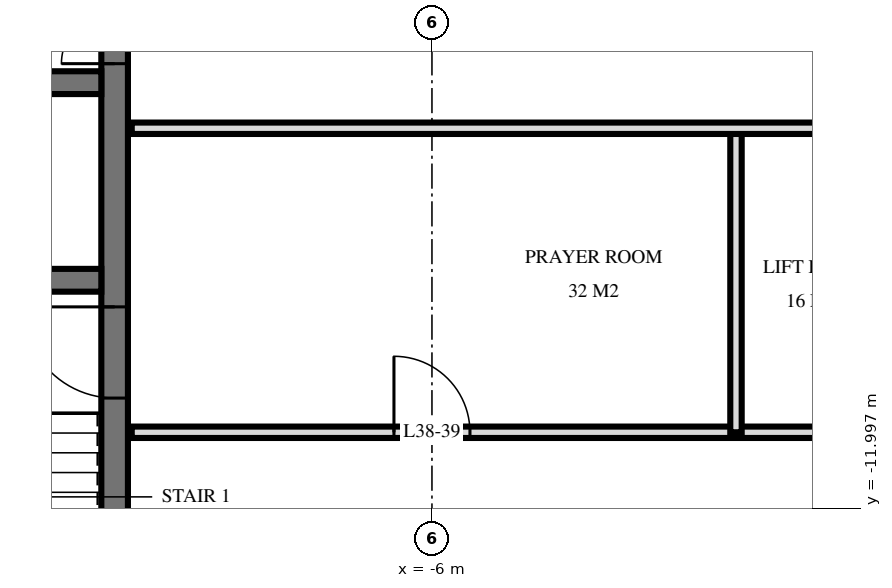
"""IFC4 building model, lengths in metres.
Left out: names, types, materials, properties, quantities, classifications, styles, units other than length and angle.
Written with IfcOpenShell. Run it as: python <this file> out.ifc"""

import sys

from ifc_helpers import new_model, si_unit, direction, frame, frame_2d, origin, place, context, subcontext, project, spatial, rectangle, extrude, element, fill, save


model = new_model("IFC4")
c1 = context("Model", 3, precision=1e-05, world=origin(), true_north=direction((0.0, 1.0)))
c2 = subcontext(c1, "Body", "Model", "MODEL_VIEW")
j1 = project(units=[si_unit("LENGTHUNIT", "METRE"), si_unit("PLANEANGLEUNIT", "RADIAN")], contexts=[c1])
p1 = place(None, origin())
s1 = spatial("IfcSite", under=j1, at=p1, CompositionType="ELEMENT")
p2 = place(p1, origin())
s2 = spatial("IfcBuilding", under=s1, at=p2, CompositionType="ELEMENT")
p3 = place(p2, frame((0.0, 0.0, 148.8)))
s3 = spatial("IfcBuildingStorey", under=s2, at=p3, CompositionType="ELEMENT", Elevation=148.8)
p4 = place(p3, frame((-10.175, -14.55, 0.0), z_axis=(0.0, 0.0, 1.0), x_axis=(0.0, 1.0, 0.0)))
e1 = element("IfcWall", 1, at=p4, inside=s3, PredefinedType="SHEAR", context=c2, shape_type="SweptSolid", body=[
    extrude(rectangle(XDim=14.1, YDim=0.35, at=frame_2d((7.05, 0.0))), origin(), (0.0, 0.0, 1.0), 3.6),
])
p5 = place(p4, frame((8.4, 0.0, 0.0)))
e2 = element("IfcOpeningElement", 2, at=p5, cuts=e1, PredefinedType="OPENING", context=c2, shape_type="SweptSolid", body=[
    extrude(rectangle(XDim=1.4, YDim=2.4, at=frame_2d((0.7, 1.2))), frame((0.0, 0.185, 0.0), z_axis=(0.0, -1.0, 0.0), x_axis=(1.0, 0.0, 0.0)), (0.0, 0.0, 1.0), 0.37),
])
p6 = place(p4, frame((10.0, 0.0, 0.0)))
e3 = element("IfcOpeningElement", 3, at=p6, cuts=e1, PredefinedType="OPENING", context=c2, shape_type="SweptSolid", body=[
    extrude(rectangle(XDim=1.4, YDim=2.4, at=frame_2d((0.7, 1.2))), frame((0.0, 0.185, 0.0), z_axis=(0.0, -1.0, 0.0), x_axis=(1.0, 0.0, 0.0)), (0.0, 0.0, 1.0), 0.37),
])
p7 = place(p4, frame((4.0, 0.0, 0.0)))
e4 = element("IfcOpeningElement", 4, at=p7, cuts=e1, PredefinedType="OPENING", context=c2, shape_type="SweptSolid", body=[
    extrude(rectangle(XDim=1.2, YDim=2.1, at=frame_2d((0.6, 1.05))), frame((0.0, 0.185, 0.0), z_axis=(0.0, -1.0, 0.0), x_axis=(1.0, 0.0, 0.0)), (0.0, 0.0, 1.0), 0.37),
])
p8 = place(p3, frame((-24.05, -6.4, 0.0), z_axis=(0.0, 0.0, 1.0), x_axis=(1.0, 0.0, 0.0)))
e5 = element("IfcWall", 5, at=p8, inside=s3, PredefinedType="SHEAR", context=c2, shape_type="SweptSolid", body=[
    extrude(rectangle(XDim=13.7, YDim=0.3, at=frame_2d((6.85, 0.0))), origin(), (0.0, 0.0, 1.0), 3.6),
])
p9 = place(p8, frame((0.55, 0.0, 0.0)))
e6 = element("IfcOpeningElement", 6, at=p9, cuts=e5, PredefinedType="OPENING", context=c2, shape_type="SweptSolid", body=[
    extrude(rectangle(XDim=1.1, YDim=2.1, at=frame_2d((0.55, 1.05))), frame((0.0, 0.16, 0.0), z_axis=(0.0, -1.0, 0.0), x_axis=(1.0, 0.0, 0.0)), (0.0, 0.0, 1.0), 0.32),
])
p10 = place(p8, frame((5.8, 0.0, 0.0)))
e7 = element("IfcOpeningElement", 7, at=p10, cuts=e5, PredefinedType="OPENING", context=c2, shape_type="SweptSolid", body=[
    extrude(rectangle(XDim=1.1, YDim=2.1, at=frame_2d((0.55, 1.05))), frame((0.0, 0.16, 0.0), z_axis=(0.0, -1.0, 0.0), x_axis=(1.0, 0.0, 0.0)), (0.0, 0.0, 1.0), 0.32),
])
p11 = place(p3, frame((-24.05, -9.0, 0.0), z_axis=(0.0, 0.0, 1.0), x_axis=(1.0, 0.0, 0.0)))
e8 = element("IfcWall", 8, at=p11, inside=s3, PredefinedType="SHEAR", context=c2, shape_type="SweptSolid", body=[
    extrude(rectangle(XDim=13.7, YDim=0.3, at=frame_2d((6.85, 0.0))), origin(), (0.0, 0.0, 1.0), 3.6),
])
p12 = place(p11, frame((8.8, 0.0, 0.0)))
e9 = element("IfcOpeningElement", 9, at=p12, cuts=e8, PredefinedType="OPENING", context=c2, shape_type="SweptSolid", body=[
    extrude(rectangle(XDim=1.1, YDim=2.1, at=frame_2d((0.55, 1.05))), frame((0.0, 0.16, 0.0), z_axis=(0.0, -1.0, 0.0), x_axis=(1.0, 0.0, 0.0)), (0.0, 0.0, 1.0), 0.32),
])
p13 = place(p3, frame((-2.0, -11.0, 0.0), z_axis=(0.0, 0.0, 1.0), x_axis=(0.0, 1.0, 0.0)))
e10 = element("IfcWall", 10, at=p13, inside=s3, PredefinedType="PARTITIONING", context=c2, shape_type="SweptSolid", body=[
    extrude(rectangle(XDim=4.0, YDim=0.15, at=frame_2d((2.0, 0.0))), origin(), (0.0, 0.0, 1.0), 3.32),
])
p14 = place(p3, frame((-9.95, -11.0, 0.0), z_axis=(0.0, 0.0, 1.0), x_axis=(1.0, 0.0, 0.0)))
e11 = element("IfcWall", 11, at=p14, inside=s3, PredefinedType="PARTITIONING", context=c2, shape_type="SweptSolid", body=[
    extrude(rectangle(XDim=19.9, YDim=0.15, at=frame_2d((9.95, 0.0))), origin(), (0.0, 0.0, 1.0), 3.32),
])
p15 = place(p14, frame((9.45, 0.0, 0.0)))
e12 = element("IfcOpeningElement", 12, at=p15, cuts=e11, PredefinedType="OPENING", context=c2, shape_type="SweptSolid", body=[
    extrude(rectangle(XDim=1.0, YDim=2.1, at=frame_2d((0.5, 1.05))), frame((0.0, 0.085, 0.0), z_axis=(0.0, -1.0, 0.0), x_axis=(1.0, 0.0, 0.0)), (0.0, 0.0, 1.0), 0.17),
])
p16 = place(p14, frame((3.45, 0.0, 0.0)))
e13 = element("IfcOpeningElement", 13, at=p16, cuts=e11, PredefinedType="OPENING", context=c2, shape_type="SweptSolid", body=[
    extrude(rectangle(XDim=1.0, YDim=2.1, at=frame_2d((0.5, 1.05))), frame((0.0, 0.085, 0.0), z_axis=(0.0, -1.0, 0.0), x_axis=(1.0, 0.0, 0.0)), (0.0, 0.0, 1.0), 0.17),
])
p17 = place(p3, frame((-9.95, -7.0, 0.0), z_axis=(0.0, 0.0, 1.0), x_axis=(1.0, 0.0, 0.0)))
e14 = element("IfcWall", 14, at=p17, inside=s3, PredefinedType="PARTITIONING", context=c2, shape_type="SweptSolid", body=[
    extrude(rectangle(XDim=19.9, YDim=0.15, at=frame_2d((9.95, 0.0))), origin(), (0.0, 0.0, 1.0), 3.32),
])
p18 = place(p17, frame((9.45, 0.0, 0.0)))
e15 = element("IfcOpeningElement", 15, at=p18, cuts=e14, PredefinedType="OPENING", context=c2, shape_type="SweptSolid", body=[
    extrude(rectangle(XDim=1.0, YDim=2.1, at=frame_2d((0.5, 1.05))), frame((0.0, 0.085, 0.0), z_axis=(0.0, -1.0, 0.0), x_axis=(1.0, 0.0, 0.0)), (0.0, 0.0, 1.0), 0.17),
])
p19 = place(p17, frame((15.45, 0.0, 0.0)))
e16 = element("IfcOpeningElement", 16, at=p19, cuts=e14, PredefinedType="OPENING", context=c2, shape_type="SweptSolid", body=[
    extrude(rectangle(XDim=1.0, YDim=2.1, at=frame_2d((0.5, 1.05))), frame((0.0, 0.085, 0.0), z_axis=(0.0, -1.0, 0.0), x_axis=(1.0, 0.0, 0.0)), (0.0, 0.0, 1.0), 0.17),
])
p20 = place(p5, origin())
e17 = element("IfcDoor", 17, at=p20, inside=s3, OperationType="DOUBLE_DOOR_SINGLE_SWING", PredefinedType="DOOR", context=c2, shape_type="SweptSolid", body=[
    extrude(rectangle(XDim=1.4, YDim=2.4, at=frame_2d((0.7, 1.2))), frame((0.0, 0.025, 0.0), z_axis=(0.0, -1.0, 0.0), x_axis=(1.0, 0.0, 0.0)), (0.0, 0.0, 1.0), 0.05),
])
fill(e2, e17)
p21 = place(p7, origin())
e18 = element("IfcDoor", 18, at=p21, inside=s3, OperationType="SINGLE_SWING_LEFT", PredefinedType="DOOR", context=c2, shape_type="SweptSolid", body=[
    extrude(rectangle(XDim=1.2, YDim=2.1, at=frame_2d((0.6, 1.05))), frame((0.0, 0.025, 0.0), z_axis=(0.0, -1.0, 0.0), x_axis=(1.0, 0.0, 0.0)), (0.0, 0.0, 1.0), 0.05),
])
fill(e4, e18)
p22 = place(p16, origin())
e19 = element("IfcDoor", 19, at=p22, inside=s3, OperationType="SINGLE_SWING_RIGHT", PredefinedType="DOOR", context=c2, shape_type="SweptSolid", body=[
    extrude(rectangle(XDim=1.0, YDim=2.1, at=frame_2d((0.5, 1.05))), frame((0.0, 0.025, 0.0), z_axis=(0.0, -1.0, 0.0), x_axis=(1.0, 0.0, 0.0)), (0.0, 0.0, 1.0), 0.05),
])
fill(e13, e19)
save(model, sys.argv[1])
